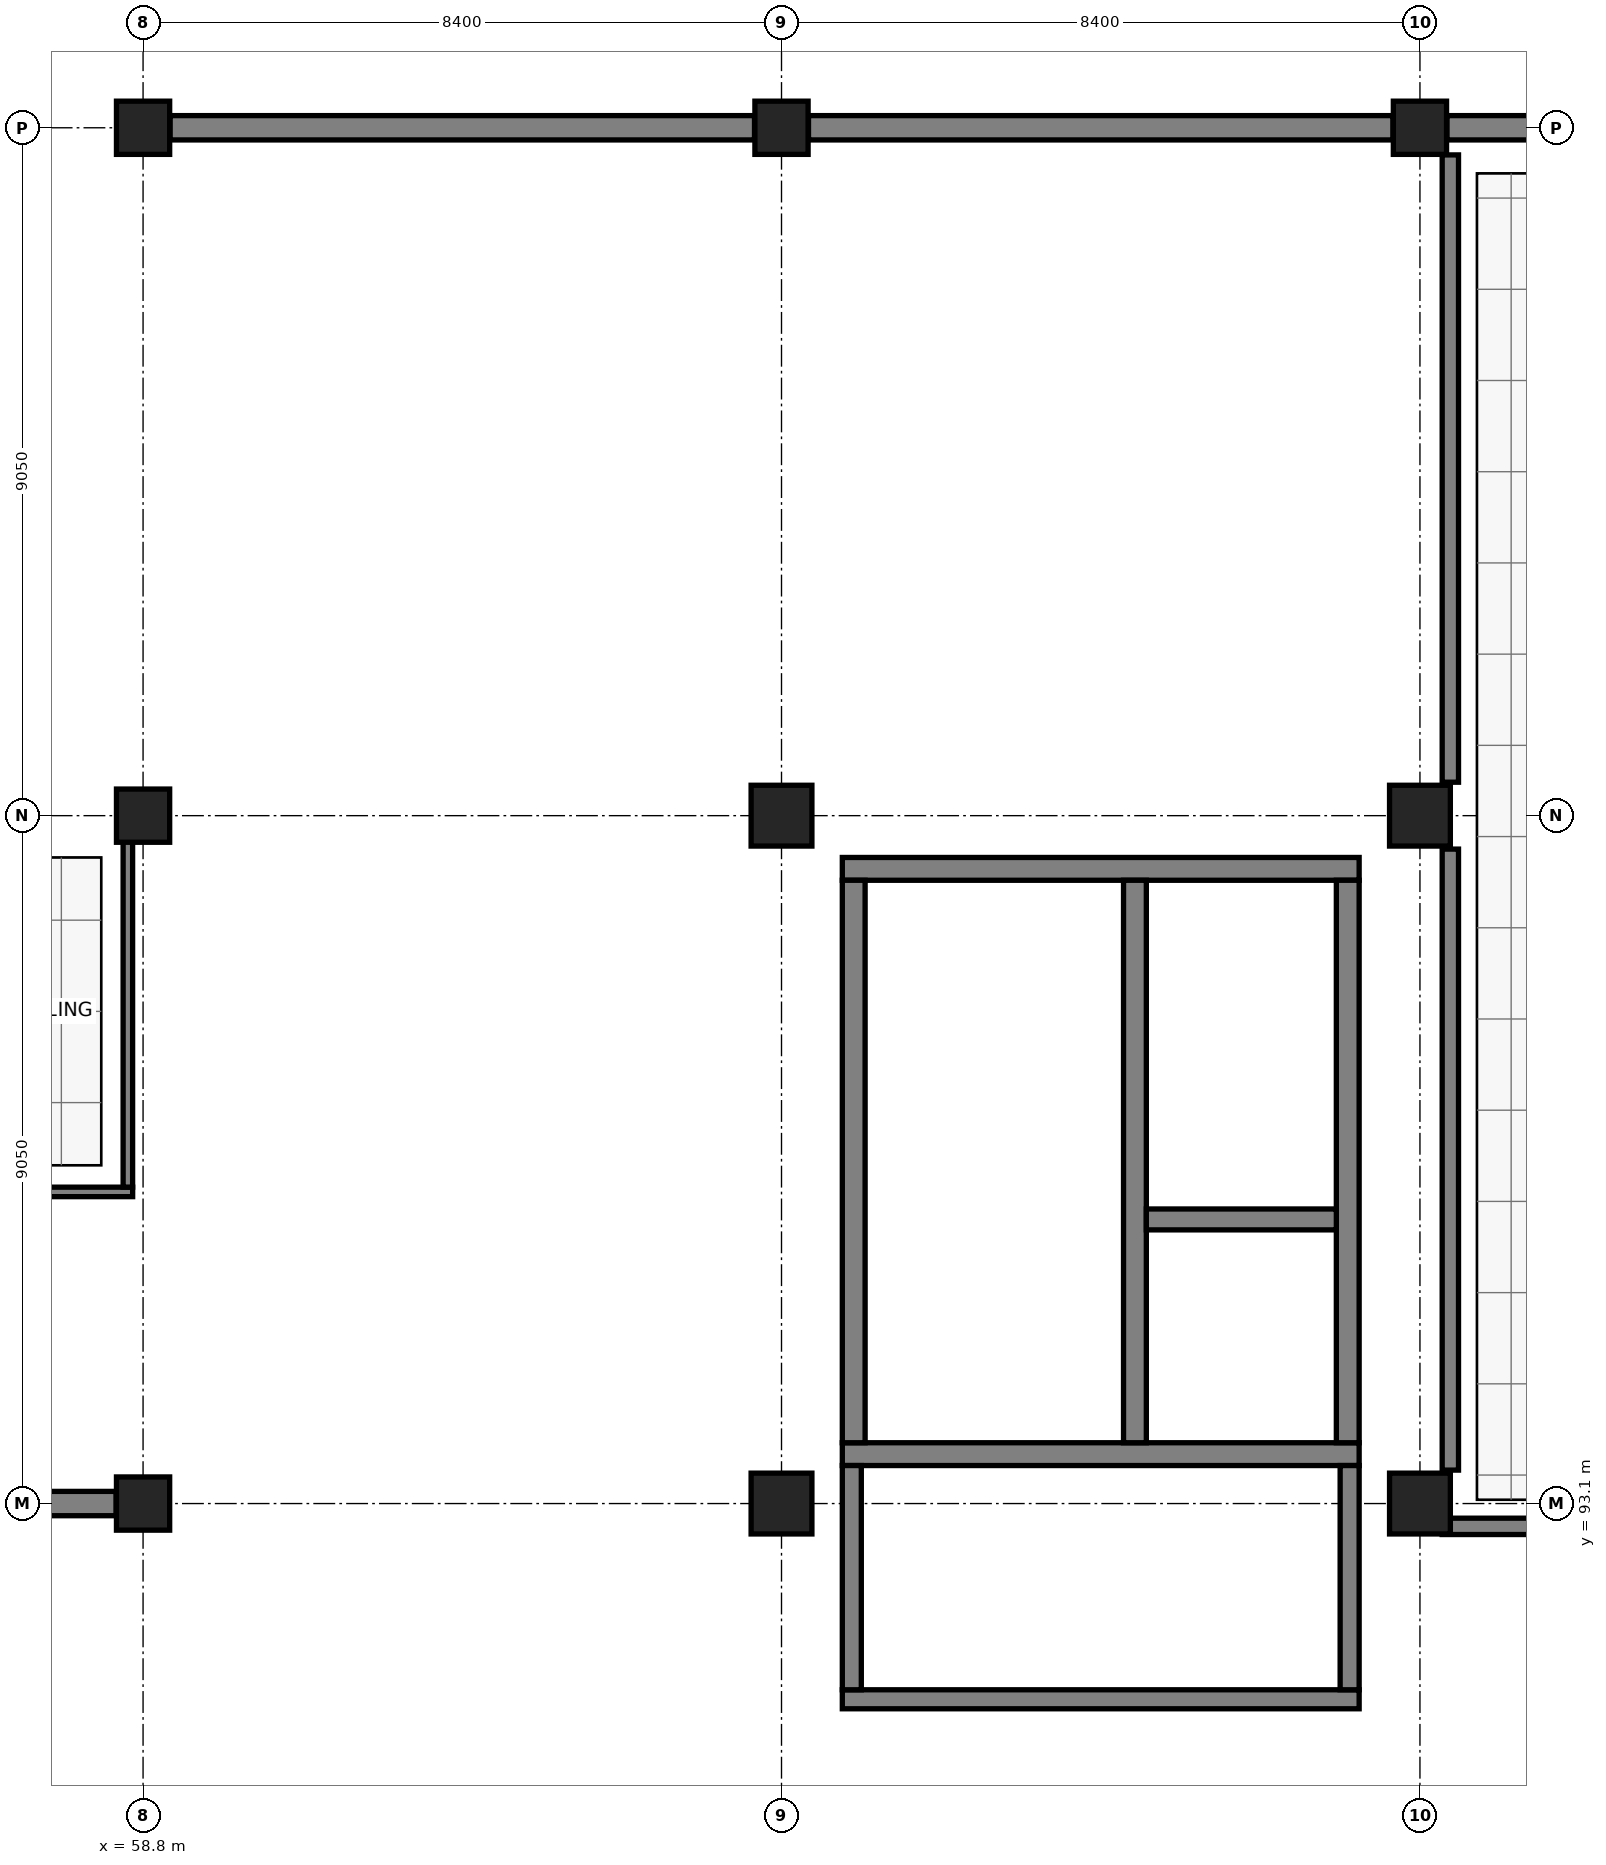
"""IFC4 building model, lengths in metres.
Left out: names, types, materials, properties, quantities, classifications, styles, units other than length and angle.
Written with IfcOpenShell. Run it as: python <this file> out.ifc"""

import sys

from ifc_helpers import new_model, si_unit, direction, frame, frame_2d, origin, origin_2d, place, context, subcontext, project, spatial, rectangle, extrude, element, fill, save


model = new_model("IFC4")
c1 = context("Model", 3, precision=1e-05, world=origin(), true_north=direction((0.0, 1.0)))
c2 = subcontext(c1, "Body", "Model", "MODEL_VIEW")
j1 = project(units=[si_unit("LENGTHUNIT", "METRE"), si_unit("PLANEANGLEUNIT", "RADIAN")], contexts=[c1])
p1 = place(None, origin())
s1 = spatial("IfcSite", under=j1, at=p1, CompositionType="ELEMENT")
p2 = place(p1, origin())
s2 = spatial("IfcBuilding", under=s1, at=p2, CompositionType="ELEMENT")
p3 = place(p2, origin())
s3 = spatial("IfcBuildingStorey", under=s2, at=p3, CompositionType="ELEMENT", Elevation=0.0)
for number, where, z_axis, x_axis in (
    (1, (58.8, 93.1, 0.0), (0.0, 0.0, 1.0), (1.0, 0.0, 0.0)),
    (2, (58.8, 102.15, 0.0), (0.0, 0.0, 1.0), (1.0, 0.0, 0.0)),
    (3, (58.8, 111.2, 0.0), (0.0, 0.0, 1.0), (1.0, 0.0, 0.0)),
):
    element("IfcColumn", number, at=place(p3, frame(where, z_axis=z_axis, x_axis=x_axis)), inside=s3, PredefinedType="COLUMN", context=c2, shape_type="SweptSolid", body=[
        extrude(rectangle(XDim=0.7, YDim=0.7, at=origin_2d()), origin(), (0.0, 0.0, 1.0), 5.4),
    ])
for number, where, z_axis, x_axis in (
    (4, (67.2, 93.1, 0.0), (0.0, 0.0, 1.0), (1.0, 0.0, 0.0)),
    (5, (67.2, 102.15, 0.0), (0.0, 0.0, 1.0), (1.0, 0.0, 0.0)),
):
    element("IfcColumn", number, at=place(p3, frame(where, z_axis=z_axis, x_axis=x_axis)), inside=s3, PredefinedType="COLUMN", context=c2, shape_type="SweptSolid", body=[
        extrude(rectangle(XDim=0.8, YDim=0.8, at=origin_2d()), origin(), (0.0, 0.0, 1.0), 5.4),
    ])
p4 = place(p3, frame((67.2, 111.2, 0.0), z_axis=(0.0, 0.0, 1.0), x_axis=(1.0, 0.0, 0.0)))
e6 = element("IfcColumn", 6, at=p4, inside=s3, PredefinedType="COLUMN", context=c2, shape_type="SweptSolid", body=[
    extrude(rectangle(XDim=0.7, YDim=0.7, at=origin_2d()), origin(), (0.0, 0.0, 1.0), 5.4),
])
for number, where, z_axis, x_axis in (
    (7, (75.6, 93.1, 0.0), (0.0, 0.0, 1.0), (1.0, 0.0, 0.0)),
    (8, (75.6, 102.15, 0.0), (0.0, 0.0, 1.0), (1.0, 0.0, 0.0)),
):
    element("IfcColumn", number, at=place(p3, frame(where, z_axis=z_axis, x_axis=x_axis)), inside=s3, PredefinedType="COLUMN", context=c2, shape_type="SweptSolid", body=[
        extrude(rectangle(XDim=0.8, YDim=0.8, at=origin_2d()), origin(), (0.0, 0.0, 1.0), 5.4),
    ])
p5 = place(p3, frame((75.6, 111.2, 0.0), z_axis=(0.0, 0.0, 1.0), x_axis=(1.0, 0.0, 0.0)))
e9 = element("IfcColumn", 9, at=p5, inside=s3, PredefinedType="COLUMN", context=c2, shape_type="SweptSolid", body=[
    extrude(rectangle(XDim=0.7, YDim=0.7, at=origin_2d()), origin(), (0.0, 0.0, 1.0), 5.4),
])
p6 = place(p3, frame((83.645, 111.2, 0.0), z_axis=(0.0, 0.0, 1.0), x_axis=(-1.0, 0.0, 0.0)))
e10 = element("IfcWall", 10, at=p6, inside=s3, PredefinedType="STANDARD", context=c2, shape_type="SweptSolid", body=[
    extrude(rectangle(XDim=7.69, YDim=0.32, at=frame_2d((3.845, 0.0))), origin(), (0.0, 0.0, 1.0), 4.531),
])
p7 = place(p6, frame((2.295, 0.0, 0.95)))
e11 = element("IfcOpeningElement", 11, at=p7, cuts=e10, PredefinedType="OPENING", context=c2, shape_type="SweptSolid", body=[
    extrude(rectangle(XDim=3.1, YDim=2.05, at=frame_2d((1.55, 1.025))), frame((0.0, 0.17, 0.0), z_axis=(0.0, -1.0, 0.0), x_axis=(1.0, 0.0, 0.0)), (0.0, 0.0, 1.0), 0.34),
])
p8 = place(p3, frame((75.245, 111.2, 0.0), z_axis=(0.0, 0.0, 1.0), x_axis=(-1.0, 0.0, 0.0)))
e12 = element("IfcWall", 12, at=p8, inside=s3, PredefinedType="STANDARD", context=c2, shape_type="SweptSolid", body=[
    extrude(rectangle(XDim=7.69, YDim=0.32, at=frame_2d((3.845, 0.0))), origin(), (0.0, 0.0, 1.0), 4.531),
])
p9 = place(p8, frame((2.845, 0.0, 0.0)))
e13 = element("IfcOpeningElement", 13, at=p9, cuts=e12, PredefinedType="OPENING", context=c2, shape_type="SweptSolid", body=[
    extrude(rectangle(XDim=2.0, YDim=2.4, at=frame_2d((1.0, 1.2))), frame((0.0, 0.17, 0.0), z_axis=(0.0, -1.0, 0.0), x_axis=(1.0, 0.0, 0.0)), (0.0, 0.0, 1.0), 0.34),
])
p10 = place(p3, frame((66.845, 111.2, 0.0), z_axis=(0.0, 0.0, 1.0), x_axis=(-1.0, 0.0, 0.0)))
e14 = element("IfcWall", 14, at=p10, inside=s3, PredefinedType="STANDARD", context=c2, shape_type="SweptSolid", body=[
    extrude(rectangle(XDim=7.69, YDim=0.32, at=frame_2d((3.845, 0.0))), origin(), (0.0, 0.0, 1.0), 4.531),
])
p11 = place(p10, frame((3.22, 0.0, 0.95)))
e15 = element("IfcOpeningElement", 15, at=p11, cuts=e14, PredefinedType="OPENING", context=c2, shape_type="SweptSolid", body=[
    extrude(rectangle(XDim=1.25, YDim=1.9, at=frame_2d((0.625, 0.95))), frame((0.0, 0.17, 0.0), z_axis=(0.0, -1.0, 0.0), x_axis=(1.0, 0.0, 0.0)), (0.0, 0.0, 1.0), 0.34),
])
p12 = place(p3, frame((50.755, 93.1, 0.0), z_axis=(0.0, 0.0, 1.0), x_axis=(1.0, 0.0, 0.0)))
e16 = element("IfcWall", 16, at=p12, inside=s3, PredefinedType="STANDARD", context=c2, shape_type="SweptSolid", body=[
    extrude(rectangle(XDim=7.69, YDim=0.32, at=frame_2d((3.845, 0.0))), origin(), (0.0, 0.0, 1.0), 4.23),
])
p13 = place(p12, frame((2.805, 0.0, 0.95)))
e17 = element("IfcOpeningElement", 17, at=p13, cuts=e16, PredefinedType="OPENING", context=c2, shape_type="SweptSolid", body=[
    extrude(rectangle(XDim=2.08, YDim=2.28, at=frame_2d((1.04, 1.14))), frame((0.0, 0.17, 0.0), z_axis=(0.0, -1.0, 0.0), x_axis=(1.0, 0.0, 0.0)), (0.0, 0.0, 1.0), 0.34),
])
p14 = place(p3, frame((68.0, 93.75, 0.0), z_axis=(0.0, 0.0, 1.0), x_axis=(1.0, 0.0, 0.0)))
e18 = element("IfcWall", 18, at=p14, inside=s3, PredefinedType="SHEAR", context=c2, shape_type="SweptSolid", body=[
    extrude(rectangle(XDim=6.8, YDim=0.3, at=frame_2d((3.4, 0.0))), origin(), (0.0, 0.0, 1.0), 5.09),
])
p15 = place(p14, frame((1.425, 0.0, 0.0)))
e19 = element("IfcOpeningElement", 19, at=p15, cuts=e18, PredefinedType="OPENING", context=c2, shape_type="SweptSolid", body=[
    extrude(rectangle(XDim=1.15, YDim=2.2, at=frame_2d((0.575, 1.1))), frame((0.0, 0.16, 0.0), z_axis=(0.0, -1.0, 0.0), x_axis=(1.0, 0.0, 0.0)), (0.0, 0.0, 1.0), 0.32),
])
p16 = place(p14, frame((4.5, 0.0, 0.0)))
e20 = element("IfcOpeningElement", 20, at=p16, cuts=e18, PredefinedType="OPENING", context=c2, shape_type="SweptSolid", body=[
    extrude(rectangle(XDim=1.5, YDim=2.3, at=frame_2d((0.75, 1.15))), frame((0.0, 0.16, 0.0), z_axis=(0.0, -1.0, 0.0), x_axis=(1.0, 0.0, 0.0)), (0.0, 0.0, 1.0), 0.32),
])
p17 = place(p3, frame((68.0, 101.45, 0.0), z_axis=(0.0, 0.0, 1.0), x_axis=(1.0, 0.0, 0.0)))
e21 = element("IfcWall", 21, at=p17, inside=s3, PredefinedType="SHEAR", context=c2, shape_type="SweptSolid", body=[
    extrude(rectangle(XDim=6.8, YDim=0.3, at=frame_2d((3.4, 0.0))), origin(), (0.0, 0.0, 1.0), 5.09),
])
for number, where, z_axis, x_axis in (
    (22, (68.15, 93.9, 0.0), (0.0, 0.0, 1.0), (0.0, 1.0, 0.0)),
    (23, (74.65, 93.9, 0.0), (0.0, 0.0, 1.0), (0.0, 1.0, 0.0)),
    (24, (71.85, 93.9, 0.0), (0.0, 0.0, 1.0), (0.0, 1.0, 0.0)),
):
    element("IfcWall", number, at=place(p3, frame(where, z_axis=z_axis, x_axis=x_axis)), inside=s3, PredefinedType="SHEAR", context=c2, shape_type="SweptSolid", body=[
        extrude(rectangle(XDim=7.4, YDim=0.3, at=frame_2d((3.7, 0.0))), origin(), (0.0, 0.0, 1.0), 5.09),
    ])
p18 = place(p3, frame((72.0, 96.838, 0.0), z_axis=(0.0, 0.0, 1.0), x_axis=(1.0, 0.0, 0.0)))
e25 = element("IfcWall", 25, at=p18, inside=s3, PredefinedType="SHEAR", context=c2, shape_type="SweptSolid", body=[
    extrude(rectangle(XDim=2.5, YDim=0.275, at=frame_2d((1.25, 0.0))), origin(), (0.0, 0.0, 1.0), 5.09),
])
p19 = place(p3, frame((68.0, 90.525, 0.0), z_axis=(0.0, 0.0, 1.0), x_axis=(1.0, 0.0, 0.0)))
e26 = element("IfcWall", 26, at=p19, inside=s3, PredefinedType="PARTITIONING", context=c2, shape_type="SweptSolid", body=[
    extrude(rectangle(XDim=6.8, YDim=0.25, at=frame_2d((3.4, 0.0))), origin(), (0.0, 0.0, 1.0), 5.09),
])
p20 = place(p19, frame((2.5, 0.0, 0.0)))
e27 = element("IfcOpeningElement", 27, at=p20, cuts=e26, PredefinedType="OPENING", context=c2, shape_type="SweptSolid", body=[
    extrude(rectangle(XDim=1.8, YDim=2.25, at=frame_2d((0.9, 1.125))), frame((0.0, 0.135, 0.0), z_axis=(0.0, -1.0, 0.0), x_axis=(1.0, 0.0, 0.0)), (0.0, 0.0, 1.0), 0.27),
])
for number, where, z_axis, x_axis in (
    (28, (68.125, 90.65, 0.0), (0.0, 0.0, 1.0), (0.0, 1.0, 0.0)),
    (29, (74.675, 90.65, 0.0), (0.0, 0.0, 1.0), (0.0, 1.0, 0.0)),
):
    element("IfcWall", number, at=place(p3, frame(where, z_axis=z_axis, x_axis=x_axis)), inside=s3, PredefinedType="PARTITIONING", context=c2, shape_type="SweptSolid", body=[
        extrude(rectangle(XDim=2.95, YDim=0.25, at=frame_2d((1.475, 0.0))), origin(), (0.0, 0.0, 1.0), 4.23),
    ])
p21 = place(p3, frame((33.737, 97.2, 0.0), z_axis=(0.0, 0.0, 1.0), x_axis=(1.0, 0.0, 0.0)))
e30 = element("IfcWall", 30, at=p21, inside=s3, PredefinedType="PARTITIONING", context=c2, shape_type="SweptSolid", body=[
    extrude(rectangle(XDim=24.926, YDim=0.125, at=frame_2d((12.463, 0.0))), origin(), (0.0, 0.0, 1.0), 4.14),
])
p22 = place(p21, frame((11.853, 0.0, 0.0)))
e31 = element("IfcOpeningElement", 31, at=p22, cuts=e30, PredefinedType="OPENING", context=c2, shape_type="SweptSolid", body=[
    extrude(rectangle(XDim=1.22, YDim=2.35, at=frame_2d((0.61, 1.175))), frame((0.0, 0.073, 0.0), z_axis=(0.0, -1.0, 0.0), x_axis=(1.0, 0.0, 0.0)), (0.0, 0.0, 1.0), 0.145),
])
p23 = place(p21, frame((13.673, 0.0, 1.05)))
e32 = element("IfcOpeningElement", 32, at=p23, cuts=e30, PredefinedType="OPENING", context=c2, shape_type="SweptSolid", body=[
    extrude(rectangle(XDim=3.0, YDim=1.45, at=frame_2d((1.5, 0.725))), frame((0.0, 0.073, 0.0), z_axis=(0.0, -1.0, 0.0), x_axis=(1.0, 0.0, 0.0)), (0.0, 0.0, 1.0), 0.145),
])
p24 = place(p3, frame((58.6, 97.263, 0.0), z_axis=(0.0, 0.0, 1.0), x_axis=(0.0, 1.0, 0.0)))
e33 = element("IfcWall", 33, at=p24, inside=s3, PredefinedType="PARTITIONING", context=c2, shape_type="SweptSolid", body=[
    extrude(rectangle(XDim=4.625, YDim=0.125, at=frame_2d((2.312, 0.0))), origin(), (0.0, 0.0, 1.0), 4.14),
])
p25 = place(p3, frame((75.892, 92.8, 0.0), z_axis=(0.0, 0.0, 1.0), x_axis=(1.0, 0.0, 0.0)))
e34 = element("IfcWall", 34, at=p25, inside=s3, PredefinedType="PARTITIONING", context=c2, shape_type="SweptSolid", body=[
    extrude(rectangle(XDim=7.668, YDim=0.215, at=frame_2d((3.834, 0.0))), origin(), (0.0, 0.0, 1.0), 4.14),
])
p26 = place(p25, frame((3.394, 0.0, 0.0)))
e35 = element("IfcOpeningElement", 35, at=p26, cuts=e34, PredefinedType="OPENING", context=c2, shape_type="SweptSolid", body=[
    extrude(rectangle(XDim=0.88, YDim=2.12, at=frame_2d((0.44, 1.06))), frame((0.0, 0.118, 0.0), z_axis=(0.0, -1.0, 0.0), x_axis=(1.0, 0.0, 0.0)), (0.0, 0.0, 1.0), 0.235),
])
p27 = place(p25, frame((4.874, 0.0, 1.05)))
e36 = element("IfcOpeningElement", 36, at=p27, cuts=e34, PredefinedType="OPENING", context=c2, shape_type="SweptSolid", body=[
    extrude(rectangle(XDim=1.95, YDim=1.55, at=frame_2d((0.975, 0.775))), frame((0.0, 0.118, 0.0), z_axis=(0.0, -1.0, 0.0), x_axis=(1.0, 0.0, 0.0)), (0.0, 0.0, 1.0), 0.235),
])
p28 = place(p3, frame((76.0, 93.54, 0.0), z_axis=(0.0, 0.0, 1.0), x_axis=(0.0, 1.0, 0.0)))
e37 = element("IfcWall", 37, at=p28, inside=s3, PredefinedType="PARTITIONING", context=c2, shape_type="SweptSolid", body=[
    extrude(rectangle(XDim=8.17, YDim=0.215, at=frame_2d((4.085, 0.0))), origin(), (0.0, 0.0, 1.0), 4.54),
])
p29 = place(p3, frame((76.0, 102.59, 0.0), z_axis=(0.0, 0.0, 1.0), x_axis=(0.0, 1.0, 0.0)))
e38 = element("IfcWall", 38, at=p29, inside=s3, PredefinedType="PARTITIONING", context=c2, shape_type="SweptSolid", body=[
    extrude(rectangle(XDim=8.253, YDim=0.215, at=frame_2d((4.126, 0.0))), origin(), (0.0, 0.0, 1.0), 5.09),
])
p30 = place(p9, frame((2.0, 0.0, 0.0), z_axis=(0.0, 0.0, 1.0), x_axis=(-1.0, 0.0, 0.0)))
e39 = element("IfcDoor", 39, at=p30, inside=s3, OperationType="DOUBLE_DOOR_SINGLE_SWING", PredefinedType="DOOR", context=c2, shape_type="SweptSolid", body=[
    extrude(rectangle(XDim=2.0, YDim=2.4, at=frame_2d((1.0, 1.2))), frame((0.0, 0.025, 0.0), z_axis=(0.0, -1.0, 0.0), x_axis=(1.0, 0.0, 0.0)), (0.0, 0.0, 1.0), 0.05),
])
fill(e13, e39)
p31 = place(p11, origin())
e40 = element("IfcWindow", 40, at=p31, inside=s3, PartitioningType="SINGLE_PANEL", PredefinedType="WINDOW", context=c2, shape_type="SweptSolid", body=[
    extrude(rectangle(XDim=1.25, YDim=1.9, at=frame_2d((0.625, 0.95))), frame((0.0, 0.03, 0.0), z_axis=(0.0, -1.0, 0.0), x_axis=(1.0, 0.0, 0.0)), (0.0, 0.0, 1.0), 0.06),
])
fill(e15, e40)
p32 = place(p15, frame((1.15, 0.0, 0.0), z_axis=(0.0, 0.0, 1.0), x_axis=(-1.0, 0.0, 0.0)))
e41 = element("IfcDoor", 41, at=p32, inside=s3, OperationType="SINGLE_SWING_RIGHT", PredefinedType="DOOR", context=c2, shape_type="SweptSolid", body=[
    extrude(rectangle(XDim=1.15, YDim=2.2, at=frame_2d((0.575, 1.1))), frame((0.0, 0.025, 0.0), z_axis=(0.0, -1.0, 0.0), x_axis=(1.0, 0.0, 0.0)), (0.0, 0.0, 1.0), 0.05),
])
fill(e19, e41)
p33 = place(p16, origin())
e42 = element("IfcDoor", 42, at=p33, inside=s3, OperationType="DOUBLE_DOOR_SLIDING", PredefinedType="DOOR", context=c2, shape_type="SweptSolid", body=[
    extrude(rectangle(XDim=1.5, YDim=2.3, at=frame_2d((0.75, 1.15))), frame((0.0, 0.025, 0.0), z_axis=(0.0, -1.0, 0.0), x_axis=(1.0, 0.0, 0.0)), (0.0, 0.0, 1.0), 0.05),
])
fill(e20, e42)
p34 = place(p20, frame((1.8, 0.0, 0.0), z_axis=(0.0, 0.0, 1.0), x_axis=(-1.0, 0.0, 0.0)))
e43 = element("IfcDoor", 43, at=p34, inside=s3, OperationType="DOUBLE_DOOR_SINGLE_SWING", PredefinedType="DOOR", context=c2, shape_type="SweptSolid", body=[
    extrude(rectangle(XDim=1.8, YDim=2.25, at=frame_2d((0.9, 1.125))), frame((0.0, 0.025, 0.0), z_axis=(0.0, -1.0, 0.0), x_axis=(1.0, 0.0, 0.0)), (0.0, 0.0, 1.0), 0.05),
])
fill(e27, e43)
save(model, sys.argv[1])
